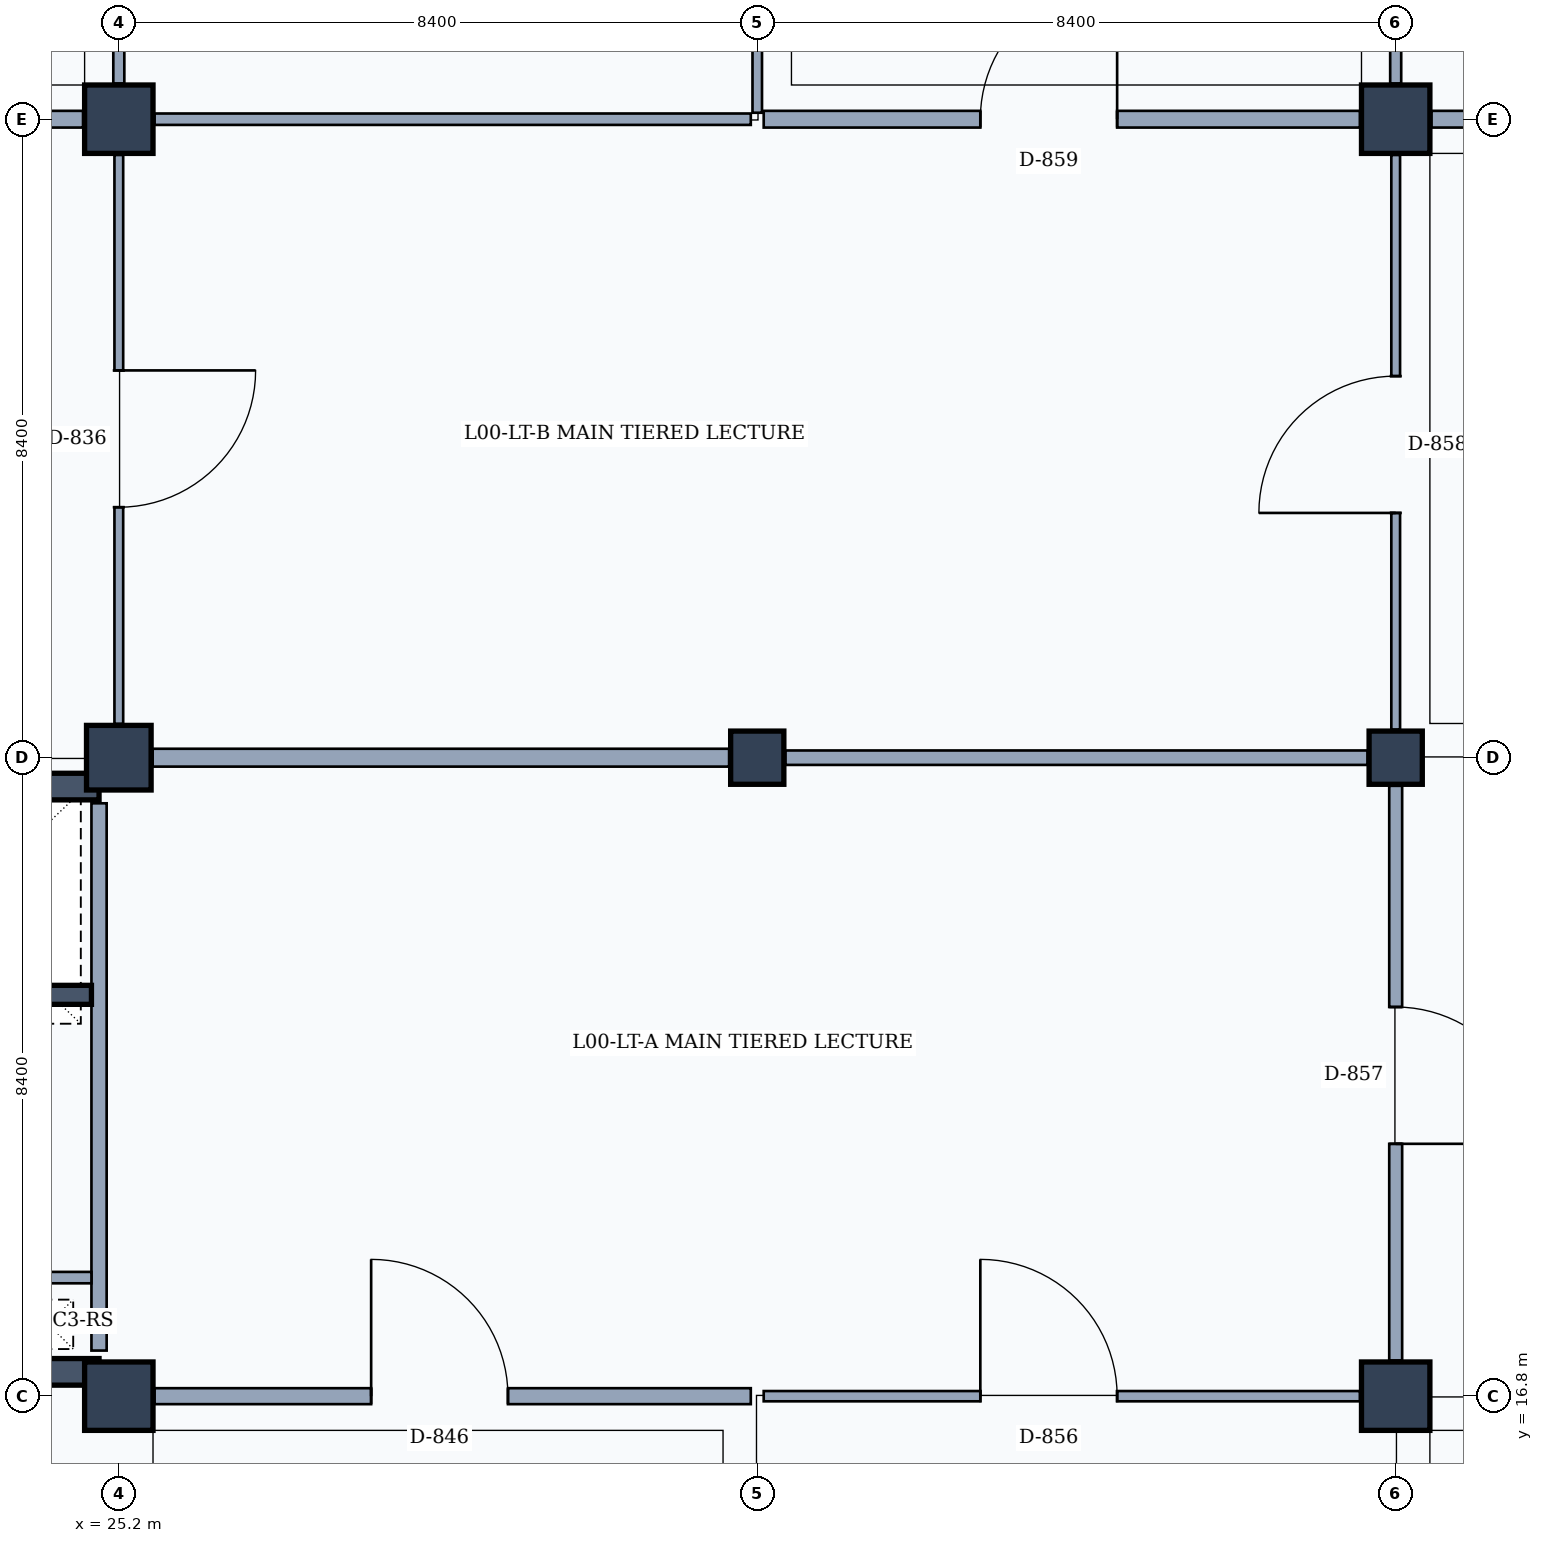
"""IFC4 building model, lengths in metres.
Left out: names, types, materials, properties, quantities, classifications, styles, units other than length and angle.
Written with IfcOpenShell. Run it as: python <this file> out.ifc"""

import sys

from ifc_helpers import new_model, si_unit, direction, frame, frame_2d, origin, origin_2d, place, context, subcontext, project, spatial, rectangle, extrude, element, fill, save


model = new_model("IFC4")
c1 = context("Model", 3, precision=1e-05, world=origin(), true_north=direction((0.0, 1.0)))
c2 = subcontext(c1, "Body", "Model", "MODEL_VIEW")
j1 = project(units=[si_unit("LENGTHUNIT", "METRE"), si_unit("PLANEANGLEUNIT", "RADIAN")], contexts=[c1])
p1 = place(None, origin())
s1 = spatial("IfcSite", under=j1, at=p1, CompositionType="ELEMENT")
p2 = place(p1, origin())
s2 = spatial("IfcBuilding", under=s1, at=p2, CompositionType="ELEMENT")
p3 = place(p2, origin())
s3 = spatial("IfcBuildingStorey", under=s2, at=p3, CompositionType="ELEMENT", Elevation=0.0)
p4 = place(p3, frame((25.2, 16.8, 0.0), z_axis=(0.0, 0.0, 1.0), x_axis=(1.0, 0.0, 0.0)))
e1 = element("IfcColumn", 1, at=p4, inside=s3, PredefinedType="COLUMN", context=c2, shape_type="SweptSolid", body=[
    extrude(rectangle(XDim=0.9, YDim=0.9, at=origin_2d()), origin(), (0.0, 0.0, 1.0), 4.8),
])
p5 = place(p3, frame((25.2, 25.2, 0.0), z_axis=(0.0, 0.0, 1.0), x_axis=(1.0, 0.0, 0.0)))
e2 = element("IfcColumn", 2, at=p5, inside=s3, PredefinedType="COLUMN", context=c2, shape_type="SweptSolid", body=[
    extrude(rectangle(XDim=0.85, YDim=0.85, at=origin_2d()), origin(), (0.0, 0.0, 1.0), 4.8),
])
p6 = place(p3, frame((25.2, 33.6, 0.0), z_axis=(0.0, 0.0, 1.0), x_axis=(1.0, 0.0, 0.0)))
e3 = element("IfcColumn", 3, at=p6, inside=s3, PredefinedType="COLUMN", context=c2, shape_type="SweptSolid", body=[
    extrude(rectangle(XDim=0.9, YDim=0.9, at=origin_2d()), origin(), (0.0, 0.0, 1.0), 4.8),
])
p7 = place(p3, frame((33.6, 25.2, 0.0), z_axis=(0.0, 0.0, 1.0), x_axis=(1.0, 0.0, 0.0)))
e4 = element("IfcColumn", 4, at=p7, inside=s3, PredefinedType="COLUMN", context=c2, shape_type="SweptSolid", body=[
    extrude(rectangle(XDim=0.7, YDim=0.7, at=origin_2d()), origin(), (0.0, 0.0, 1.0), 4.8),
])
p8 = place(p3, frame((42.0, 16.8, 0.0), z_axis=(0.0, 0.0, 1.0), x_axis=(1.0, 0.0, 0.0)))
e5 = element("IfcColumn", 5, at=p8, inside=s3, PredefinedType="COLUMN", context=c2, shape_type="SweptSolid", body=[
    extrude(rectangle(XDim=0.9, YDim=0.9, at=origin_2d()), origin(), (0.0, 0.0, 1.0), 4.8),
])
p9 = place(p3, frame((42.0, 25.2, 0.0), z_axis=(0.0, 0.0, 1.0), x_axis=(1.0, 0.0, 0.0)))
e6 = element("IfcColumn", 6, at=p9, inside=s3, PredefinedType="COLUMN", context=c2, shape_type="SweptSolid", body=[
    extrude(rectangle(XDim=0.7, YDim=0.7, at=origin_2d()), origin(), (0.0, 0.0, 1.0), 4.8),
])
p10 = place(p3, frame((42.0, 33.6, 0.0), z_axis=(0.0, 0.0, 1.0), x_axis=(1.0, 0.0, 0.0)))
e7 = element("IfcColumn", 7, at=p10, inside=s3, PredefinedType="COLUMN", context=c2, shape_type="SweptSolid", body=[
    extrude(rectangle(XDim=0.9, YDim=0.9, at=origin_2d()), origin(), (0.0, 0.0, 1.0), 4.8),
])
p11 = place(p3, frame((17.065, 24.82, 0.0), z_axis=(0.0, 0.0, 1.0), x_axis=(1.0, 0.0, 0.0)))
e8 = element("IfcWall", 8, at=p11, inside=s3, PredefinedType="SHEAR", context=c2, shape_type="SweptSolid", body=[
    extrude(rectangle(XDim=7.875, YDim=0.35, at=frame_2d((3.938, 0.0))), origin(), (0.0, 0.0, 1.0), 4.54),
])
p12 = place(p3, frame((24.94, 24.6, 0.0), z_axis=(0.0, 0.0, 1.0), x_axis=(0.0, -1.0, 0.0)))
e9 = element("IfcWall", 9, at=p12, inside=s3, PredefinedType="PARTITIONING", context=c2, shape_type="SweptSolid", body=[
    extrude(rectangle(XDim=7.2, YDim=0.2, at=frame_2d((3.6, 0.0))), origin(), (0.0, 0.0, 1.0), 3.92),
])
p13 = place(p3, frame((24.94, 17.12, 0.0), z_axis=(0.0, 0.0, 1.0), x_axis=(-1.0, 0.0, 0.0)))
e10 = element("IfcWall", 10, at=p13, inside=s3, PredefinedType="SHEAR", context=c2, shape_type="SweptSolid", body=[
    extrude(rectangle(XDim=7.875, YDim=0.35, at=frame_2d((3.938, 0.0))), origin(), (0.0, 0.0, 1.0), 4.54),
])
p14 = place(p13, frame((2.1, 0.0, 0.0)))
e11 = element("IfcOpeningElement", 11, at=p14, cuts=e10, PredefinedType="OPENING", context=c2, shape_type="SweptSolid", body=[
    extrude(rectangle(XDim=1.1, YDim=2.15, at=frame_2d((0.55, 1.075))), frame((0.0, 0.185, 0.0), z_axis=(0.0, -1.0, 0.0), x_axis=(1.0, 0.0, 0.0)), (0.0, 0.0, 1.0), 0.37),
])
p15 = place(p3, frame((23.98, 18.36, 0.0), z_axis=(0.0, 0.0, 1.0), x_axis=(1.0, 0.0, 0.0)))
e12 = element("IfcWall", 12, at=p15, inside=s3, PredefinedType="PARTITIONING", context=c2, shape_type="SweptSolid", body=[
    extrude(rectangle(XDim=0.86, YDim=0.15, at=frame_2d((0.43, 0.0))), origin(), (0.0, 0.0, 1.0), 3.92),
])
p16 = place(p3, frame((21.38, 22.08, 0.0), z_axis=(0.0, 0.0, 1.0), x_axis=(1.0, 0.0, 0.0)))
e13 = element("IfcWall", 13, at=p16, inside=s3, PredefinedType="SHEAR", context=c2, shape_type="SweptSolid", body=[
    extrude(rectangle(XDim=3.46, YDim=0.25, at=frame_2d((1.73, 0.0))), origin(), (0.0, 0.0, 1.0), 4.54),
])
p17 = place(p16, frame((1.1, 0.0, 0.0)))
e14 = element("IfcOpeningElement", 14, at=p17, cuts=e13, PredefinedType="OPENING", context=c2, shape_type="SweptSolid", body=[
    extrude(rectangle(XDim=1.1, YDim=2.15, at=frame_2d((0.55, 1.075))), frame((0.0, 0.135, 0.0), z_axis=(0.0, -1.0, 0.0), x_axis=(1.0, 0.0, 0.0)), (0.0, 0.0, 1.0), 0.27),
])
p18 = place(p3, frame((25.2, 25.645, 0.0), z_axis=(0.0, 0.0, 1.0), x_axis=(0.0, 1.0, 0.0)))
e15 = element("IfcWall", 15, at=p18, inside=s3, PredefinedType="PARTITIONING", context=c2, shape_type="SweptSolid", body=[
    extrude(rectangle(XDim=7.485, YDim=0.115, at=frame_2d((3.742, 0.0))), origin(), (0.0, 0.0, 1.0), 3.92),
])
p19 = place(p18, frame((2.85, 0.0, 0.0)))
e16 = element("IfcOpeningElement", 16, at=p19, cuts=e15, PredefinedType="OPENING", context=c2, shape_type="SweptSolid", body=[
    extrude(rectangle(XDim=1.8, YDim=2.3, at=frame_2d((0.9, 1.15))), frame((0.0, 0.067, 0.0), z_axis=(0.0, -1.0, 0.0), x_axis=(1.0, 0.0, 0.0)), (0.0, 0.0, 1.0), 0.135),
])
p20 = place(p3, frame((17.17, 33.6, 0.0), z_axis=(0.0, 0.0, 1.0), x_axis=(1.0, 0.0, 0.0)))
e17 = element("IfcWall", 17, at=p20, inside=s3, PredefinedType="PARTITIONING", context=c2, shape_type="SweptSolid", body=[
    extrude(rectangle(XDim=7.56, YDim=0.22, at=frame_2d((3.78, 0.0))), origin(), (0.0, 0.0, 1.0), 3.85),
])
p21 = place(p3, frame((25.2, 34.07, 0.0), z_axis=(0.0, 0.0, 1.0), x_axis=(0.0, 1.0, 0.0)))
e18 = element("IfcWall", 18, at=p21, inside=s3, PredefinedType="PARTITIONING", context=c2, shape_type="SweptSolid", body=[
    extrude(rectangle(XDim=7.61, YDim=0.145, at=frame_2d((3.805, 0.0))), origin(), (0.0, 0.0, 1.0), 3.92),
])
p22 = place(p21, frame((3.05, 0.0, 0.0)))
e19 = element("IfcOpeningElement", 19, at=p22, cuts=e18, PredefinedType="OPENING", context=c2, shape_type="SweptSolid", body=[
    extrude(rectangle(XDim=1.4, YDim=2.25, at=frame_2d((0.7, 1.125))), frame((0.0, 0.083, 0.0), z_axis=(0.0, -1.0, 0.0), x_axis=(1.0, 0.0, 0.0)), (0.0, 0.0, 1.0), 0.165),
])
p23 = place(p3, frame((25.67, 16.8, 0.0), z_axis=(0.0, 0.0, 1.0), x_axis=(1.0, 0.0, 0.0)))
e20 = element("IfcWall", 20, at=p23, inside=s3, PredefinedType="PARTITIONING", context=c2, shape_type="SweptSolid", body=[
    extrude(rectangle(XDim=7.845, YDim=0.21, at=frame_2d((3.922, 0.0))), origin(), (0.0, 0.0, 1.0), 3.92),
])
p24 = place(p23, frame((2.85, 0.0, 0.0)))
e21 = element("IfcOpeningElement", 21, at=p24, cuts=e20, PredefinedType="OPENING", context=c2, shape_type="SweptSolid", body=[
    extrude(rectangle(XDim=1.8, YDim=2.3, at=frame_2d((0.9, 1.15))), frame((0.0, 0.115, 0.0), z_axis=(0.0, -1.0, 0.0), x_axis=(1.0, 0.0, 0.0)), (0.0, 0.0, 1.0), 0.23),
])
p25 = place(p3, frame((25.645, 25.2, 0.0), z_axis=(0.0, 0.0, 1.0), x_axis=(1.0, 0.0, 0.0)))
e22 = element("IfcWall", 22, at=p25, inside=s3, PredefinedType="PARTITIONING", context=c2, shape_type="SweptSolid", body=[
    extrude(rectangle(XDim=7.585, YDim=0.235, at=frame_2d((3.792, 0.0))), origin(), (0.0, 0.0, 1.0), 3.85),
])
p26 = place(p3, frame((25.67, 33.6, 0.0), z_axis=(0.0, 0.0, 1.0), x_axis=(1.0, 0.0, 0.0)))
e23 = element("IfcWall", 23, at=p26, inside=s3, PredefinedType="PARTITIONING", context=c2, shape_type="SweptSolid", body=[
    extrude(rectangle(XDim=7.845, YDim=0.15, at=frame_2d((3.922, 0.0))), origin(), (0.0, 0.0, 1.0), 3.92),
])
p27 = place(p3, frame((33.6, 33.685, 0.0), z_axis=(0.0, 0.0, 1.0), x_axis=(0.0, 1.0, 0.0)))
e24 = element("IfcWall", 24, at=p27, inside=s3, PredefinedType="PARTITIONING", context=c2, shape_type="SweptSolid", body=[
    extrude(rectangle(XDim=7.995, YDim=0.125, at=frame_2d((3.998, 0.0))), origin(), (0.0, 0.0, 1.0), 3.92),
])
p28 = place(p3, frame((33.685, 16.8, 0.0), z_axis=(0.0, 0.0, 1.0), x_axis=(1.0, 0.0, 0.0)))
e25 = element("IfcWall", 25, at=p28, inside=s3, PredefinedType="PARTITIONING", context=c2, shape_type="SweptSolid", body=[
    extrude(rectangle(XDim=7.845, YDim=0.135, at=frame_2d((3.922, 0.0))), origin(), (0.0, 0.0, 1.0), 3.92),
])
p29 = place(p28, frame((2.85, 0.0, 0.0)))
e26 = element("IfcOpeningElement", 26, at=p29, cuts=e25, PredefinedType="OPENING", context=c2, shape_type="SweptSolid", body=[
    extrude(rectangle(XDim=1.8, YDim=2.3, at=frame_2d((0.9, 1.15))), frame((0.0, 0.077, 0.0), z_axis=(0.0, -1.0, 0.0), x_axis=(1.0, 0.0, 0.0)), (0.0, 0.0, 1.0), 0.155),
])
p30 = place(p3, frame((42.0, 17.27, 0.0), z_axis=(0.0, 0.0, 1.0), x_axis=(0.0, 1.0, 0.0)))
e27 = element("IfcWall", 27, at=p30, inside=s3, PredefinedType="PARTITIONING", context=c2, shape_type="SweptSolid", body=[
    extrude(rectangle(XDim=7.56, YDim=0.17, at=frame_2d((3.78, 0.0))), origin(), (0.0, 0.0, 1.0), 3.92),
])
p31 = place(p30, frame((2.85, 0.0, 0.0)))
e28 = element("IfcOpeningElement", 28, at=p31, cuts=e27, PredefinedType="OPENING", context=c2, shape_type="SweptSolid", body=[
    extrude(rectangle(XDim=1.8, YDim=2.3, at=frame_2d((0.9, 1.15))), frame((0.0, 0.095, 0.0), z_axis=(0.0, -1.0, 0.0), x_axis=(1.0, 0.0, 0.0)), (0.0, 0.0, 1.0), 0.19),
])
p32 = place(p3, frame((33.97, 25.2, 0.0), z_axis=(0.0, 0.0, 1.0), x_axis=(1.0, 0.0, 0.0)))
e29 = element("IfcWall", 29, at=p32, inside=s3, PredefinedType="PARTITIONING", context=c2, shape_type="SweptSolid", body=[
    extrude(rectangle(XDim=7.66, YDim=0.19, at=frame_2d((3.83, 0.0))), origin(), (0.0, 0.0, 1.0), 3.85),
])
p33 = place(p3, frame((42.0, 25.57, 0.0), z_axis=(0.0, 0.0, 1.0), x_axis=(0.0, 1.0, 0.0)))
e30 = element("IfcWall", 30, at=p33, inside=s3, PredefinedType="PARTITIONING", context=c2, shape_type="SweptSolid", body=[
    extrude(rectangle(XDim=7.56, YDim=0.115, at=frame_2d((3.78, 0.0))), origin(), (0.0, 0.0, 1.0), 3.92),
])
p34 = place(p33, frame((2.85, 0.0, 0.0)))
e31 = element("IfcOpeningElement", 31, at=p34, cuts=e30, PredefinedType="OPENING", context=c2, shape_type="SweptSolid", body=[
    extrude(rectangle(XDim=1.8, YDim=2.3, at=frame_2d((0.9, 1.15))), frame((0.0, 0.067, 0.0), z_axis=(0.0, -1.0, 0.0), x_axis=(1.0, 0.0, 0.0)), (0.0, 0.0, 1.0), 0.135),
])
p35 = place(p3, frame((33.685, 33.6, 0.0), z_axis=(0.0, 0.0, 1.0), x_axis=(1.0, 0.0, 0.0)))
e32 = element("IfcWall", 32, at=p35, inside=s3, PredefinedType="PARTITIONING", context=c2, shape_type="SweptSolid", body=[
    extrude(rectangle(XDim=7.845, YDim=0.22, at=frame_2d((3.922, 0.0))), origin(), (0.0, 0.0, 1.0), 3.92),
])
p36 = place(p35, frame((2.85, 0.0, 0.0)))
e33 = element("IfcOpeningElement", 33, at=p36, cuts=e32, PredefinedType="OPENING", context=c2, shape_type="SweptSolid", body=[
    extrude(rectangle(XDim=1.8, YDim=2.3, at=frame_2d((0.9, 1.15))), frame((0.0, 0.12, 0.0), z_axis=(0.0, -1.0, 0.0), x_axis=(1.0, 0.0, 0.0)), (0.0, 0.0, 1.0), 0.24),
])
p37 = place(p3, frame((42.0, 34.07, 0.0), z_axis=(0.0, 0.0, 1.0), x_axis=(0.0, 1.0, 0.0)))
e34 = element("IfcWall", 34, at=p37, inside=s3, PredefinedType="PARTITIONING", context=c2, shape_type="SweptSolid", body=[
    extrude(rectangle(XDim=7.61, YDim=0.145, at=frame_2d((3.805, 0.0))), origin(), (0.0, 0.0, 1.0), 3.92),
])
p38 = place(p3, frame((42.47, 33.6, 0.0), z_axis=(0.0, 0.0, 1.0), x_axis=(1.0, 0.0, 0.0)))
e35 = element("IfcWall", 35, at=p38, inside=s3, PredefinedType="PARTITIONING", context=c2, shape_type="SweptSolid", body=[
    extrude(rectangle(XDim=7.56, YDim=0.22, at=frame_2d((3.78, 0.0))), origin(), (0.0, 0.0, 1.0), 3.85),
])
p39 = place(p38, frame((3.025, 0.0, 0.0)))
e36 = element("IfcOpeningElement", 36, at=p39, cuts=e35, PredefinedType="OPENING", context=c2, shape_type="SweptSolid", body=[
    extrude(rectangle(XDim=1.45, YDim=2.35, at=frame_2d((0.725, 1.175))), frame((0.0, 0.12, 0.0), z_axis=(0.0, -1.0, 0.0), x_axis=(1.0, 0.0, 0.0)), (0.0, 0.0, 1.0), 0.24),
])
p40 = place(p19, frame((1.8, 0.0, 0.0), z_axis=(0.0, 0.0, 1.0), x_axis=(-1.0, 0.0, 0.0)))
e37 = element("IfcDoor", 37, at=p40, inside=s3, OperationType="SINGLE_SWING_LEFT", PredefinedType="DOOR", context=c2, shape_type="SweptSolid", body=[
    extrude(rectangle(XDim=1.8, YDim=2.3, at=frame_2d((0.9, 1.15))), frame((0.0, 0.025, 0.0), z_axis=(0.0, -1.0, 0.0), x_axis=(1.0, 0.0, 0.0)), (0.0, 0.0, 1.0), 0.05),
])
fill(e16, e37)
p41 = place(p24, origin())
e38 = element("IfcDoor", 38, at=p41, inside=s3, OperationType="SINGLE_SWING_LEFT", PredefinedType="DOOR", context=c2, shape_type="SweptSolid", body=[
    extrude(rectangle(XDim=1.8, YDim=2.3, at=frame_2d((0.9, 1.15))), frame((0.0, 0.025, 0.0), z_axis=(0.0, -1.0, 0.0), x_axis=(1.0, 0.0, 0.0)), (0.0, 0.0, 1.0), 0.05),
])
fill(e21, e38)
p42 = place(p29, origin())
e39 = element("IfcDoor", 39, at=p42, inside=s3, OperationType="SINGLE_SWING_LEFT", PredefinedType="DOOR", context=c2, shape_type="SweptSolid", body=[
    extrude(rectangle(XDim=1.8, YDim=2.3, at=frame_2d((0.9, 1.15))), frame((0.0, 0.025, 0.0), z_axis=(0.0, -1.0, 0.0), x_axis=(1.0, 0.0, 0.0)), (0.0, 0.0, 1.0), 0.05),
])
fill(e26, e39)
p43 = place(p31, frame((1.8, 0.0, 0.0), z_axis=(0.0, 0.0, 1.0), x_axis=(-1.0, 0.0, 0.0)))
e40 = element("IfcDoor", 40, at=p43, inside=s3, OperationType="SINGLE_SWING_RIGHT", PredefinedType="DOOR", context=c2, shape_type="SweptSolid", body=[
    extrude(rectangle(XDim=1.8, YDim=2.3, at=frame_2d((0.9, 1.15))), frame((0.0, 0.025, 0.0), z_axis=(0.0, -1.0, 0.0), x_axis=(1.0, 0.0, 0.0)), (0.0, 0.0, 1.0), 0.05),
])
fill(e28, e40)
p44 = place(p34, origin())
e41 = element("IfcDoor", 41, at=p44, inside=s3, OperationType="SINGLE_SWING_LEFT", PredefinedType="DOOR", context=c2, shape_type="SweptSolid", body=[
    extrude(rectangle(XDim=1.8, YDim=2.3, at=frame_2d((0.9, 1.15))), frame((0.0, 0.025, 0.0), z_axis=(0.0, -1.0, 0.0), x_axis=(1.0, 0.0, 0.0)), (0.0, 0.0, 1.0), 0.05),
])
fill(e31, e41)
p45 = place(p36, origin())
e42 = element("IfcDoor", 42, at=p45, inside=s3, OperationType="SINGLE_SWING_RIGHT", PredefinedType="DOOR", context=c2, shape_type="SweptSolid", body=[
    extrude(rectangle(XDim=1.8, YDim=2.3, at=frame_2d((0.9, 1.15))), frame((0.0, 0.025, 0.0), z_axis=(0.0, -1.0, 0.0), x_axis=(1.0, 0.0, 0.0)), (0.0, 0.0, 1.0), 0.05),
])
fill(e33, e42)
save(model, sys.argv[1])
